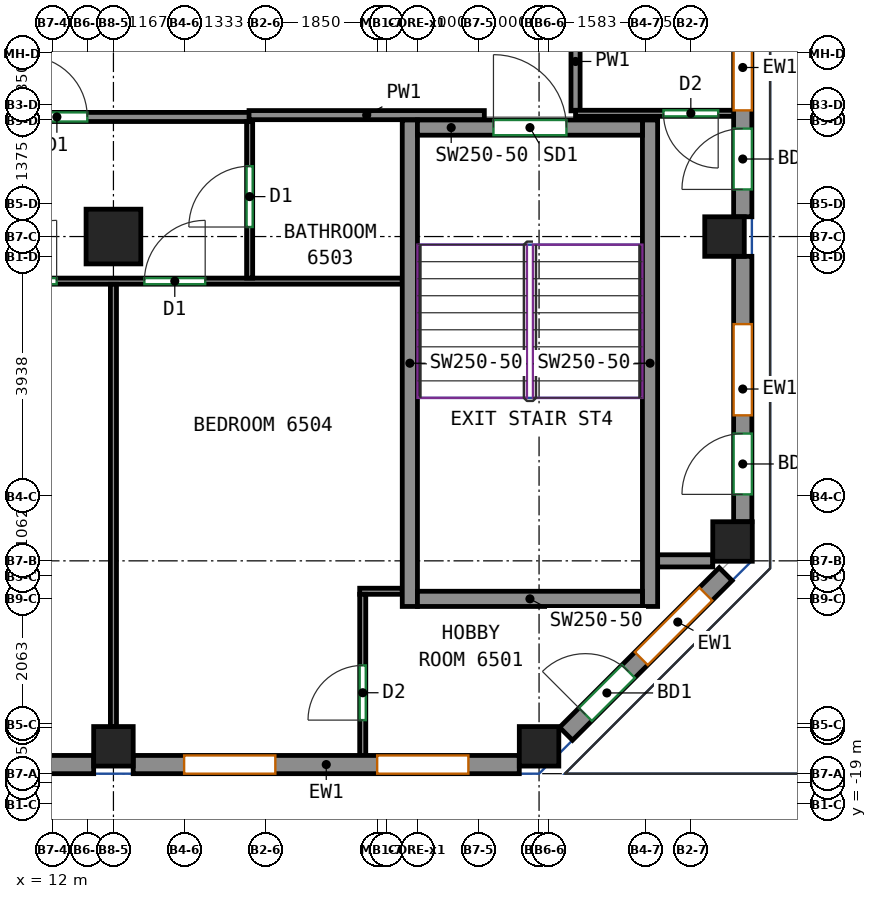
"""IFC4 building model, lengths in metres.
Left out: names, types, materials, properties, quantities, classifications, styles, units other than length and angle.
Written with IfcOpenShell. Run it as: python <this file> out.ifc"""

import sys

from ifc_helpers import new_model, si_unit, direction, frame, frame_2d, origin, origin_2d, place, context, subcontext, project, spatial, rectangle, extrude, source, transform, mapped, element, fill, save


model = new_model("IFC4")
c1 = context("Model", 3, precision=1e-05, world=origin(), true_north=direction((0.0, 1.0)))
c2 = subcontext(c1, "Body", "Model", "MODEL_VIEW")
j1 = project(units=[si_unit("LENGTHUNIT", "METRE"), si_unit("PLANEANGLEUNIT", "RADIAN")], contexts=[c1])
p1 = place(None, origin())
s1 = spatial("IfcSite", under=j1, at=p1, CompositionType="ELEMENT")
p2 = place(p1, origin())
s2 = spatial("IfcBuilding", under=s1, at=p2, CompositionType="ELEMENT")
p3 = place(p2, frame((0.0, 0.0, 267.0)))
s3 = spatial("IfcBuildingStorey", under=s2, at=p3, CompositionType="ELEMENT", Elevation=267.0)
m1 = source(origin(), c2, "Body", "SweptSolid", [
    extrude(rectangle(XDim=0.65, YDim=0.65, at=origin_2d()), origin(), (0.0, 0.0, 1.0), 3.12),
])
p4 = place(p3, frame((13.0, -18.05, 0.0), z_axis=(0.0, 0.0, 1.0), x_axis=(1.0, 0.0, 0.0)))
e1 = element("IfcColumn", 1, at=p4, inside=s3, PredefinedType="COLUMN", context=c2, shape_type="MappedRepresentation", body=[
    mapped(m1, transform((0.0, 0.0, 0.0))),
])
m2 = source(origin(), c2, "Body", "SweptSolid", [
    extrude(rectangle(XDim=0.9, YDim=0.9, at=origin_2d()), origin(), (0.0, 0.0, 1.0), 3.12),
])
p5 = place(p3, frame((13.0, -9.667, 0.0), z_axis=(0.0, 0.0, 1.0), x_axis=(1.0, 0.0, 0.0)))
e2 = element("IfcColumn", 2, at=p5, inside=s3, PredefinedType="COLUMN", context=c2, shape_type="MappedRepresentation", body=[
    mapped(m2, transform((0.0, 0.0, 0.0))),
])
for number, where, z_axis, x_axis in (
    (3, (20.0, -18.05, 0.0), (0.0, 0.0, 1.0), (1.0, 0.0, 0.0)),
    (4, (23.05, -9.667, 0.0), (0.0, 0.0, 1.0), (1.0, 0.0, 0.0)),
    (5, (23.182, -14.682, 0.0), (0.0, 0.0, 1.0), (1.0, 0.0, 0.0)),
):
    element("IfcColumn", number, at=place(p3, frame(where, z_axis=z_axis, x_axis=x_axis)), inside=s3, PredefinedType="COLUMN", context=c2, shape_type="MappedRepresentation", body=[
        mapped(m1, transform((0.0, 0.0, 0.0))),
    ])
m3 = source(origin(), c2, "Body", "SweptSolid", [
    extrude(rectangle(XDim=8.0, YDim=0.25, at=frame_2d((4.0, 0.0))), origin(), (0.0, 0.0, 1.0), 3.12),
])
for number, where, z_axis, x_axis in (
    (6, (17.875, -15.75, 0.0), (0.0, 0.0, 1.0), (0.0, 1.0, 0.0)),
    (7, (21.825, -15.75, 0.0), (0.0, 0.0, 1.0), (0.0, 1.0, 0.0)),
):
    element("IfcWall", number, at=place(p3, frame(where, z_axis=z_axis, x_axis=x_axis)), inside=s3, PredefinedType="SHEAR", context=c2, shape_type="MappedRepresentation", body=[
        mapped(m3, transform((0.0, 0.0, 0.0))),
    ])
m4 = source(origin(), c2, "Body", "SweptSolid", [
    extrude(rectangle(XDim=3.7, YDim=0.25, at=frame_2d((1.85, 0.0))), origin(), (0.0, 0.0, 1.0), 3.12),
])
p6 = place(p3, frame((18.0, -15.625, 0.0), z_axis=(0.0, 0.0, 1.0), x_axis=(1.0, 0.0, 0.0)))
e8 = element("IfcWall", 8, at=p6, inside=s3, PredefinedType="SHEAR", context=c2, shape_type="MappedRepresentation", body=[
    mapped(m4, transform((0.0, 0.0, 0.0))),
])
p7 = place(p3, frame((18.0, -7.875, 0.0), z_axis=(0.0, 0.0, 1.0), x_axis=(1.0, 0.0, 0.0)))
e9 = element("IfcWall", 9, at=p7, inside=s3, PredefinedType="SHEAR", context=c2, shape_type="MappedRepresentation", body=[
    mapped(m4, transform((0.0, 0.0, 0.0))),
])
p8 = place(p7, frame((1.25, 0.0, 0.0)))
e10 = element("IfcOpeningElement", 10, at=p8, cuts=e9, PredefinedType="OPENING", context=c2, shape_type="SweptSolid", body=[
    extrude(rectangle(XDim=1.2, YDim=2.1, at=frame_2d((0.6, 1.05))), frame((0.0, 0.135, 0.0), z_axis=(0.0, -1.0, 0.0), x_axis=(1.0, 0.0, 0.0)), (0.0, 0.0, 1.0), 0.27),
])
m5 = source(origin(), c2, "Body", "SweptSolid", [
    extrude(rectangle(XDim=6.35, YDim=0.3, at=frame_2d((3.175, 0.0))), origin(), (0.0, 0.0, 1.0), 3.12),
])
p9 = place(p3, frame((6.325, -18.35, 0.0), z_axis=(0.0, 0.0, 1.0), x_axis=(1.0, 0.0, 0.0)))
e11 = element("IfcWall", 11, at=p9, inside=s3, PredefinedType="SOLIDWALL", context=c2, shape_type="MappedRepresentation", body=[
    mapped(m5, transform((0.0, 0.0, 0.0))),
])
p10 = place(p9, frame((0.837, 0.0, 0.8)))
e12 = element("IfcOpeningElement", 12, at=p10, cuts=e11, PredefinedType="OPENING", context=c2, shape_type="SweptSolid", body=[
    extrude(rectangle(XDim=1.5, YDim=2.05, at=frame_2d((0.75, 1.025))), frame((0.0, 0.16, 0.0), z_axis=(0.0, -1.0, 0.0), x_axis=(1.0, 0.0, 0.0)), (0.0, 0.0, 1.0), 0.32),
])
p11 = place(p9, frame((4.012, 0.0, 0.8)))
e13 = element("IfcOpeningElement", 13, at=p11, cuts=e11, PredefinedType="OPENING", context=c2, shape_type="SweptSolid", body=[
    extrude(rectangle(XDim=1.5, YDim=2.05, at=frame_2d((0.75, 1.025))), frame((0.0, 0.16, 0.0), z_axis=(0.0, -1.0, 0.0), x_axis=(1.0, 0.0, 0.0)), (0.0, 0.0, 1.0), 0.32),
])
p12 = place(p3, frame((13.325, -18.35, 0.0), z_axis=(0.0, 0.0, 1.0), x_axis=(1.0, 0.0, 0.0)))
e14 = element("IfcWall", 14, at=p12, inside=s3, PredefinedType="SOLIDWALL", context=c2, shape_type="MappedRepresentation", body=[
    mapped(m5, transform((0.0, 0.0, 0.0))),
])
p13 = place(p12, frame((0.837, 0.0, 0.8)))
e15 = element("IfcOpeningElement", 15, at=p13, cuts=e14, PredefinedType="OPENING", context=c2, shape_type="SweptSolid", body=[
    extrude(rectangle(XDim=1.5, YDim=2.05, at=frame_2d((0.75, 1.025))), frame((0.0, 0.16, 0.0), z_axis=(0.0, -1.0, 0.0), x_axis=(1.0, 0.0, 0.0)), (0.0, 0.0, 1.0), 0.32),
])
p14 = place(p12, frame((4.012, 0.0, 0.8)))
e16 = element("IfcOpeningElement", 16, at=p14, cuts=e14, PredefinedType="OPENING", context=c2, shape_type="SweptSolid", body=[
    extrude(rectangle(XDim=1.5, YDim=2.05, at=frame_2d((0.75, 1.025))), frame((0.0, 0.16, 0.0), z_axis=(0.0, -1.0, 0.0), x_axis=(1.0, 0.0, 0.0)), (0.0, 0.0, 1.0), 0.32),
])
m6 = source(origin(), c2, "Body", "SweptSolid", [
    extrude(rectangle(XDim=3.712, YDim=0.3, at=frame_2d((1.856, 0.0))), origin(), (0.0, 0.0, 1.0), 3.12),
])
p15 = place(p3, frame((20.444, -17.844, 0.0), z_axis=(0.0, 0.0, 1.0), x_axis=(0.707106781187, 0.707106781187, 0.0)))
e17 = element("IfcWall", 17, at=p15, inside=s3, PredefinedType="SOLIDWALL", context=c2, shape_type="MappedRepresentation", body=[
    mapped(m6, transform((0.0, 0.0, 0.0))),
])
p16 = place(p15, frame((1.75, 0.0, 0.8)))
e18 = element("IfcOpeningElement", 18, at=p16, cuts=e17, PredefinedType="OPENING", context=c2, shape_type="SweptSolid", body=[
    extrude(rectangle(XDim=1.5, YDim=2.05, at=frame_2d((0.75, 1.025))), frame((0.0, 0.16, 0.0), z_axis=(0.0, -1.0, 0.0), x_axis=(1.0, 0.0, 0.0)), (0.0, 0.0, 1.0), 0.32),
])
p17 = place(p15, frame((0.45, 0.0, 0.0)))
e19 = element("IfcOpeningElement", 19, at=p17, cuts=e17, PredefinedType="OPENING", context=c2, shape_type="SweptSolid", body=[
    extrude(rectangle(XDim=1.0, YDim=2.1, at=frame_2d((0.5, 1.05))), frame((0.0, 0.16, 0.0), z_axis=(0.0, -1.0, 0.0), x_axis=(1.0, 0.0, 0.0)), (0.0, 0.0, 1.0), 0.32),
])
m7 = source(origin(), c2, "Body", "SweptSolid", [
    extrude(rectangle(XDim=4.365, YDim=0.3, at=frame_2d((2.183, 0.0))), origin(), (0.0, 0.0, 1.0), 3.12),
])
p18 = place(p3, frame((23.35, -14.357, 0.0), z_axis=(0.0, 0.0, 1.0), x_axis=(0.0, 1.0, 0.0)))
e20 = element("IfcWall", 20, at=p18, inside=s3, PredefinedType="SOLIDWALL", context=c2, shape_type="MappedRepresentation", body=[
    mapped(m7, transform((0.0, 0.0, 0.0))),
])
p19 = place(p18, frame((1.75, 0.0, 0.8)))
e21 = element("IfcOpeningElement", 21, at=p19, cuts=e20, PredefinedType="OPENING", context=c2, shape_type="SweptSolid", body=[
    extrude(rectangle(XDim=1.5, YDim=2.05, at=frame_2d((0.75, 1.025))), frame((0.0, 0.16, 0.0), z_axis=(0.0, -1.0, 0.0), x_axis=(1.0, 0.0, 0.0)), (0.0, 0.0, 1.0), 0.32),
])
p20 = place(p18, frame((0.45, 0.0, 0.0)))
e22 = element("IfcOpeningElement", 22, at=p20, cuts=e20, PredefinedType="OPENING", context=c2, shape_type="SweptSolid", body=[
    extrude(rectangle(XDim=1.0, YDim=2.1, at=frame_2d((0.5, 1.05))), frame((0.0, 0.16, 0.0), z_axis=(0.0, -1.0, 0.0), x_axis=(1.0, 0.0, 0.0)), (0.0, 0.0, 1.0), 0.32),
])
m8 = source(origin(), c2, "Body", "SweptSolid", [
    extrude(rectangle(XDim=8.184, YDim=0.3, at=frame_2d((4.092, 0.0))), origin(), (0.0, 0.0, 1.0), 3.12),
])
p21 = place(p3, frame((23.35, -9.342, 0.0), z_axis=(0.0, 0.0, 1.0), x_axis=(0.0, 1.0, 0.0)))
e23 = element("IfcWall", 23, at=p21, inside=s3, PredefinedType="SOLIDWALL", context=c2, shape_type="MappedRepresentation", body=[
    mapped(m8, transform((0.0, 0.0, 0.0))),
])
p22 = place(p21, frame((1.75, 0.0, 0.8)))
e24 = element("IfcOpeningElement", 24, at=p22, cuts=e23, PredefinedType="OPENING", context=c2, shape_type="SweptSolid", body=[
    extrude(rectangle(XDim=1.5, YDim=2.05, at=frame_2d((0.75, 1.025))), frame((0.0, 0.16, 0.0), z_axis=(0.0, -1.0, 0.0), x_axis=(1.0, 0.0, 0.0)), (0.0, 0.0, 1.0), 0.32),
])
p23 = place(p21, frame((0.45, 0.0, 0.0)))
e25 = element("IfcOpeningElement", 25, at=p23, cuts=e23, PredefinedType="OPENING", context=c2, shape_type="SweptSolid", body=[
    extrude(rectangle(XDim=1.0, YDim=2.1, at=frame_2d((0.5, 1.05))), frame((0.0, 0.16, 0.0), z_axis=(0.0, -1.0, 0.0), x_axis=(1.0, 0.0, 0.0)), (0.0, 0.0, 1.0), 0.32),
])
p24 = place(p21, frame((5.842, 0.0, 0.8)))
e26 = element("IfcOpeningElement", 26, at=p24, cuts=e23, PredefinedType="OPENING", context=c2, shape_type="SweptSolid", body=[
    extrude(rectangle(XDim=1.5, YDim=2.05, at=frame_2d((0.75, 1.025))), frame((0.0, 0.16, 0.0), z_axis=(0.0, -1.0, 0.0), x_axis=(1.0, 0.0, 0.0)), (0.0, 0.0, 1.0), 0.32),
])
p25 = place(p21, frame((4.542, 0.0, 0.0)))
e27 = element("IfcOpeningElement", 27, at=p25, cuts=e23, PredefinedType="OPENING", context=c2, shape_type="SweptSolid", body=[
    extrude(rectangle(XDim=1.0, YDim=2.1, at=frame_2d((0.5, 1.05))), frame((0.0, 0.16, 0.0), z_axis=(0.0, -1.0, 0.0), x_axis=(1.0, 0.0, 0.0)), (0.0, 0.0, 1.0), 0.32),
])
p26 = place(p3, frame((-4.51, -7.7, 0.0), z_axis=(0.0, 0.0, 1.0), x_axis=(1.0, 0.0, 0.0)))
e28 = element("IfcWall", 28, at=p26, inside=s3, PredefinedType="PARTITIONING", context=c2, shape_type="SweptSolid", body=[
    extrude(rectangle(XDim=19.76, YDim=0.15, at=frame_2d((9.88, 0.0))), origin(), (0.0, 0.0, 1.0), 3.12),
])
p27 = place(p26, frame((3.566, 0.0, 0.0)))
e29 = element("IfcOpeningElement", 29, at=p27, cuts=e28, PredefinedType="OPENING", context=c2, shape_type="SweptSolid", body=[
    extrude(rectangle(XDim=1.0, YDim=2.1, at=frame_2d((0.5, 1.05))), frame((0.0, 0.085, 0.0), z_axis=(0.0, -1.0, 0.0), x_axis=(1.0, 0.0, 0.0)), (0.0, 0.0, 1.0), 0.17),
])
p28 = place(p26, frame((16.08, 0.0, 0.0)))
e30 = element("IfcOpeningElement", 30, at=p28, cuts=e28, PredefinedType="OPENING", context=c2, shape_type="SweptSolid", body=[
    extrude(rectangle(XDim=1.0, YDim=2.1, at=frame_2d((0.5, 1.05))), frame((0.0, 0.085, 0.0), z_axis=(0.0, -1.0, 0.0), x_axis=(1.0, 0.0, 0.0)), (0.0, 0.0, 1.0), 0.17),
])
p29 = place(p3, frame((15.23, -7.67, 0.0), z_axis=(0.0, 0.0, 1.0), x_axis=(1.0, 0.0, 0.0)))
e31 = element("IfcWall", 31, at=p29, inside=s3, PredefinedType="PARTITIONING", context=c2, shape_type="SweptSolid", body=[
    extrude(rectangle(XDim=3.87, YDim=0.15, at=frame_2d((1.935, 0.0))), origin(), (0.0, 0.0, 1.0), 3.12),
])
p30 = place(p3, frame((20.6, -7.6, 0.0), z_axis=(0.0, 0.0, 1.0), x_axis=(0.0, 1.0, 0.0)))
e32 = element("IfcWall", 32, at=p30, inside=s3, PredefinedType="PARTITIONING", context=c2, shape_type="SweptSolid", body=[
    extrude(rectangle(XDim=1.625, YDim=0.15, at=frame_2d((0.812, 0.0))), origin(), (0.0, 0.0, 1.0), 3.12),
])
p31 = place(p3, frame((-4.6, -10.4, 0.0), z_axis=(0.0, 0.0, 1.0), x_axis=(1.0, 0.0, 0.0)))
e33 = element("IfcWall", 33, at=p31, inside=s3, PredefinedType="PARTITIONING", context=c2, shape_type="SweptSolid", body=[
    extrude(rectangle(XDim=22.35, YDim=0.1, at=frame_2d((11.175, 0.0))), origin(), (0.0, 0.0, 1.0), 3.12),
])
p32 = place(p31, frame((3.96, 0.0, 0.0)))
e34 = element("IfcOpeningElement", 34, at=p32, cuts=e33, PredefinedType="OPENING", context=c2, shape_type="SweptSolid", body=[
    extrude(rectangle(XDim=1.0, YDim=2.1, at=frame_2d((0.5, 1.05))), frame((0.0, 0.06, 0.0), z_axis=(0.0, -1.0, 0.0), x_axis=(1.0, 0.0, 0.0)), (0.0, 0.0, 1.0), 0.12),
])
p33 = place(p31, frame((15.666, 0.0, 0.0)))
e35 = element("IfcOpeningElement", 35, at=p33, cuts=e33, PredefinedType="OPENING", context=c2, shape_type="SweptSolid", body=[
    extrude(rectangle(XDim=1.0, YDim=2.1, at=frame_2d((0.5, 1.05))), frame((0.0, 0.06, 0.0), z_axis=(0.0, -1.0, 0.0), x_axis=(1.0, 0.0, 0.0)), (0.0, 0.0, 1.0), 0.12),
])
p34 = place(p31, frame((18.109, 0.0, 0.0)))
e36 = element("IfcOpeningElement", 36, at=p34, cuts=e33, PredefinedType="OPENING", context=c2, shape_type="SweptSolid", body=[
    extrude(rectangle(XDim=1.0, YDim=2.1, at=frame_2d((0.5, 1.05))), frame((0.0, 0.06, 0.0), z_axis=(0.0, -1.0, 0.0), x_axis=(1.0, 0.0, 0.0)), (0.0, 0.0, 1.0), 0.12),
])
p35 = place(p3, frame((15.24, -10.35, 0.0), z_axis=(0.0, 0.0, 1.0), x_axis=(0.0, 1.0, 0.0)))
e37 = element("IfcWall", 37, at=p35, inside=s3, PredefinedType="PARTITIONING", context=c2, shape_type="SweptSolid", body=[
    extrude(rectangle(XDim=2.573, YDim=0.1, at=frame_2d((1.287, 0.0))), origin(), (0.0, 0.0, 1.0), 3.12),
])
p36 = place(p35, frame((0.84, 0.0, 0.0)))
e38 = element("IfcOpeningElement", 38, at=p36, cuts=e37, PredefinedType="OPENING", context=c2, shape_type="SweptSolid", body=[
    extrude(rectangle(XDim=1.0, YDim=2.1, at=frame_2d((0.5, 1.05))), frame((0.0, 0.06, 0.0), z_axis=(0.0, -1.0, 0.0), x_axis=(1.0, 0.0, 0.0)), (0.0, 0.0, 1.0), 0.12),
])
p37 = place(p3, frame((13.0, -17.725, 0.0), z_axis=(0.0, 0.0, 1.0), x_axis=(0.0, 1.0, 0.0)))
e39 = element("IfcWall", 39, at=p37, inside=s3, PredefinedType="PARTITIONING", context=c2, shape_type="SweptSolid", body=[
    extrude(rectangle(XDim=7.273, YDim=0.1, at=frame_2d((3.637, 0.0))), origin(), (0.0, 0.0, 1.0), 3.12),
])
p38 = place(p3, frame((17.05, -15.5, 0.0), z_axis=(0.0, 0.0, 1.0), x_axis=(1.0, 0.0, 0.0)))
e40 = element("IfcWall", 40, at=p38, inside=s3, PredefinedType="PARTITIONING", context=c2, shape_type="SweptSolid", body=[
    extrude(rectangle(XDim=0.7, YDim=0.1, at=frame_2d((0.35, 0.0))), origin(), (0.0, 0.0, 1.0), 3.12),
])
p39 = place(p3, frame((17.1, -18.25, 0.0), z_axis=(0.0, 0.0, 1.0), x_axis=(0.0, 1.0, 0.0)))
e41 = element("IfcWall", 41, at=p39, inside=s3, PredefinedType="PARTITIONING", context=c2, shape_type="SweptSolid", body=[
    extrude(rectangle(XDim=2.7, YDim=0.1, at=frame_2d((1.35, 0.0))), origin(), (0.0, 0.0, 1.0), 3.12),
])
p40 = place(p39, frame((0.631, 0.0, 0.0)))
e42 = element("IfcOpeningElement", 42, at=p40, cuts=e41, PredefinedType="OPENING", context=c2, shape_type="SweptSolid", body=[
    extrude(rectangle(XDim=0.9, YDim=2.1, at=frame_2d((0.45, 1.05))), frame((0.0, 0.06, 0.0), z_axis=(0.0, -1.0, 0.0), x_axis=(1.0, 0.0, 0.0)), (0.0, 0.0, 1.0), 0.12),
])
p41 = place(p3, frame((21.95, -15.0, 0.0), z_axis=(0.0, 0.0, 1.0), x_axis=(1.0, 0.0, 0.0)))
e43 = element("IfcWall", 43, at=p41, inside=s3, PredefinedType="PARTITIONING", context=c2, shape_type="SweptSolid", body=[
    extrude(rectangle(XDim=0.907, YDim=0.2, at=frame_2d((0.454, 0.0))), origin(), (0.0, 0.0, 1.0), 3.12),
])
p42 = place(p3, frame((23.25, -7.64, 0.0), z_axis=(0.0, 0.0, 1.0), x_axis=(-1.0, 0.0, 0.0)))
e44 = element("IfcWall", 44, at=p42, inside=s3, PredefinedType="PARTITIONING", context=c2, shape_type="SweptSolid", body=[
    extrude(rectangle(XDim=2.65, YDim=0.1, at=frame_2d((1.325, 0.0))), origin(), (0.0, 0.0, 1.0), 3.12),
])
p43 = place(p42, frame((0.304, 0.0, 0.0)))
e45 = element("IfcOpeningElement", 45, at=p43, cuts=e44, PredefinedType="OPENING", context=c2, shape_type="SweptSolid", body=[
    extrude(rectangle(XDim=0.9, YDim=2.1, at=frame_2d((0.45, 1.05))), frame((0.0, 0.06, 0.0), z_axis=(0.0, -1.0, 0.0), x_axis=(1.0, 0.0, 0.0)), (0.0, 0.0, 1.0), 0.12),
])
p44 = place(p13, origin())
e46 = element("IfcWindow", 46, at=p44, inside=s3, PartitioningType="SINGLE_PANEL", PredefinedType="WINDOW", context=c2, shape_type="SweptSolid", body=[
    extrude(rectangle(XDim=1.5, YDim=2.05, at=frame_2d((0.75, 1.025))), frame((0.0, 0.03, 0.0), z_axis=(0.0, -1.0, 0.0), x_axis=(1.0, 0.0, 0.0)), (0.0, 0.0, 1.0), 0.06),
])
fill(e15, e46)
p45 = place(p14, origin())
e47 = element("IfcWindow", 47, at=p45, inside=s3, PartitioningType="SINGLE_PANEL", PredefinedType="WINDOW", context=c2, shape_type="SweptSolid", body=[
    extrude(rectangle(XDim=1.5, YDim=2.05, at=frame_2d((0.75, 1.025))), frame((0.0, 0.03, 0.0), z_axis=(0.0, -1.0, 0.0), x_axis=(1.0, 0.0, 0.0)), (0.0, 0.0, 1.0), 0.06),
])
fill(e16, e47)
p46 = place(p16, origin())
e48 = element("IfcWindow", 48, at=p46, inside=s3, PartitioningType="SINGLE_PANEL", PredefinedType="WINDOW", context=c2, shape_type="SweptSolid", body=[
    extrude(rectangle(XDim=1.5, YDim=2.05, at=frame_2d((0.75, 1.025))), frame((0.0, 0.03, 0.0), z_axis=(0.0, -1.0, 0.0), x_axis=(1.0, 0.0, 0.0)), (0.0, 0.0, 1.0), 0.06),
])
fill(e18, e48)
p47 = place(p17, origin())
e49 = element("IfcDoor", 49, at=p47, inside=s3, OperationType="SINGLE_SWING_LEFT", PredefinedType="DOOR", context=c2, shape_type="SweptSolid", body=[
    extrude(rectangle(XDim=1.0, YDim=2.1, at=frame_2d((0.5, 1.05))), frame((0.0, 0.025, 0.0), z_axis=(0.0, -1.0, 0.0), x_axis=(1.0, 0.0, 0.0)), (0.0, 0.0, 1.0), 0.05),
])
fill(e19, e49)
p48 = place(p19, origin())
e50 = element("IfcWindow", 50, at=p48, inside=s3, PartitioningType="SINGLE_PANEL", PredefinedType="WINDOW", context=c2, shape_type="SweptSolid", body=[
    extrude(rectangle(XDim=1.5, YDim=2.05, at=frame_2d((0.75, 1.025))), frame((0.0, 0.03, 0.0), z_axis=(0.0, -1.0, 0.0), x_axis=(1.0, 0.0, 0.0)), (0.0, 0.0, 1.0), 0.06),
])
fill(e21, e50)
p49 = place(p20, origin())
e51 = element("IfcDoor", 51, at=p49, inside=s3, OperationType="SINGLE_SWING_LEFT", PredefinedType="DOOR", context=c2, shape_type="SweptSolid", body=[
    extrude(rectangle(XDim=1.0, YDim=2.1, at=frame_2d((0.5, 1.05))), frame((0.0, 0.025, 0.0), z_axis=(0.0, -1.0, 0.0), x_axis=(1.0, 0.0, 0.0)), (0.0, 0.0, 1.0), 0.05),
])
fill(e22, e51)
p50 = place(p22, origin())
e52 = element("IfcWindow", 52, at=p50, inside=s3, PartitioningType="SINGLE_PANEL", PredefinedType="WINDOW", context=c2, shape_type="SweptSolid", body=[
    extrude(rectangle(XDim=1.5, YDim=2.05, at=frame_2d((0.75, 1.025))), frame((0.0, 0.03, 0.0), z_axis=(0.0, -1.0, 0.0), x_axis=(1.0, 0.0, 0.0)), (0.0, 0.0, 1.0), 0.06),
])
fill(e24, e52)
p51 = place(p23, origin())
e53 = element("IfcDoor", 53, at=p51, inside=s3, OperationType="SINGLE_SWING_LEFT", PredefinedType="DOOR", context=c2, shape_type="SweptSolid", body=[
    extrude(rectangle(XDim=1.0, YDim=2.1, at=frame_2d((0.5, 1.05))), frame((0.0, 0.025, 0.0), z_axis=(0.0, -1.0, 0.0), x_axis=(1.0, 0.0, 0.0)), (0.0, 0.0, 1.0), 0.05),
])
fill(e25, e53)
p52 = place(p8, origin())
e54 = element("IfcDoor", 54, at=p52, inside=s3, OperationType="DOUBLE_DOOR_SINGLE_SWING", PredefinedType="DOOR", context=c2, shape_type="SweptSolid", body=[
    extrude(rectangle(XDim=1.2, YDim=2.1, at=frame_2d((0.6, 1.05))), frame((0.0, 0.025, 0.0), z_axis=(0.0, -1.0, 0.0), x_axis=(1.0, 0.0, 0.0)), (0.0, 0.0, 1.0), 0.05),
])
fill(e10, e54)
p53 = place(p40, origin())
e55 = element("IfcDoor", 55, at=p53, inside=s3, OperationType="SINGLE_SWING_LEFT", PredefinedType="DOOR", context=c2, shape_type="SweptSolid", body=[
    extrude(rectangle(XDim=0.9, YDim=2.1, at=frame_2d((0.45, 1.05))), frame((0.0, 0.025, 0.0), z_axis=(0.0, -1.0, 0.0), x_axis=(1.0, 0.0, 0.0)), (0.0, 0.0, 1.0), 0.05),
])
fill(e42, e55)
p54 = place(p33, origin())
e56 = element("IfcDoor", 56, at=p54, inside=s3, OperationType="SINGLE_SWING_RIGHT", PredefinedType="DOOR", context=c2, shape_type="SweptSolid", body=[
    extrude(rectangle(XDim=1.0, YDim=2.1, at=frame_2d((0.5, 1.05))), frame((0.0, 0.025, 0.0), z_axis=(0.0, -1.0, 0.0), x_axis=(1.0, 0.0, 0.0)), (0.0, 0.0, 1.0), 0.05),
])
fill(e35, e56)
p55 = place(p34, origin())
e57 = element("IfcDoor", 57, at=p55, inside=s3, OperationType="SINGLE_SWING_RIGHT", PredefinedType="DOOR", context=c2, shape_type="SweptSolid", body=[
    extrude(rectangle(XDim=1.0, YDim=2.1, at=frame_2d((0.5, 1.05))), frame((0.0, 0.025, 0.0), z_axis=(0.0, -1.0, 0.0), x_axis=(1.0, 0.0, 0.0)), (0.0, 0.0, 1.0), 0.05),
])
fill(e36, e57)
p56 = place(p36, origin())
e58 = element("IfcDoor", 58, at=p56, inside=s3, OperationType="SINGLE_SWING_LEFT", PredefinedType="DOOR", context=c2, shape_type="SweptSolid", body=[
    extrude(rectangle(XDim=1.0, YDim=2.1, at=frame_2d((0.5, 1.05))), frame((0.0, 0.025, 0.0), z_axis=(0.0, -1.0, 0.0), x_axis=(1.0, 0.0, 0.0)), (0.0, 0.0, 1.0), 0.05),
])
fill(e38, e58)
p57 = place(p28, origin())
e59 = element("IfcDoor", 59, at=p57, inside=s3, OperationType="SINGLE_SWING_LEFT", PredefinedType="DOOR", context=c2, shape_type="SweptSolid", body=[
    extrude(rectangle(XDim=1.0, YDim=2.1, at=frame_2d((0.5, 1.05))), frame((0.0, 0.025, 0.0), z_axis=(0.0, -1.0, 0.0), x_axis=(1.0, 0.0, 0.0)), (0.0, 0.0, 1.0), 0.05),
])
fill(e30, e59)
p58 = place(p43, origin())
e60 = element("IfcDoor", 60, at=p58, inside=s3, OperationType="SINGLE_SWING_LEFT", PredefinedType="DOOR", context=c2, shape_type="SweptSolid", body=[
    extrude(rectangle(XDim=0.9, YDim=2.1, at=frame_2d((0.45, 1.05))), frame((0.0, 0.025, 0.0), z_axis=(0.0, -1.0, 0.0), x_axis=(1.0, 0.0, 0.0)), (0.0, 0.0, 1.0), 0.05),
])
fill(e45, e60)
save(model, sys.argv[1])
